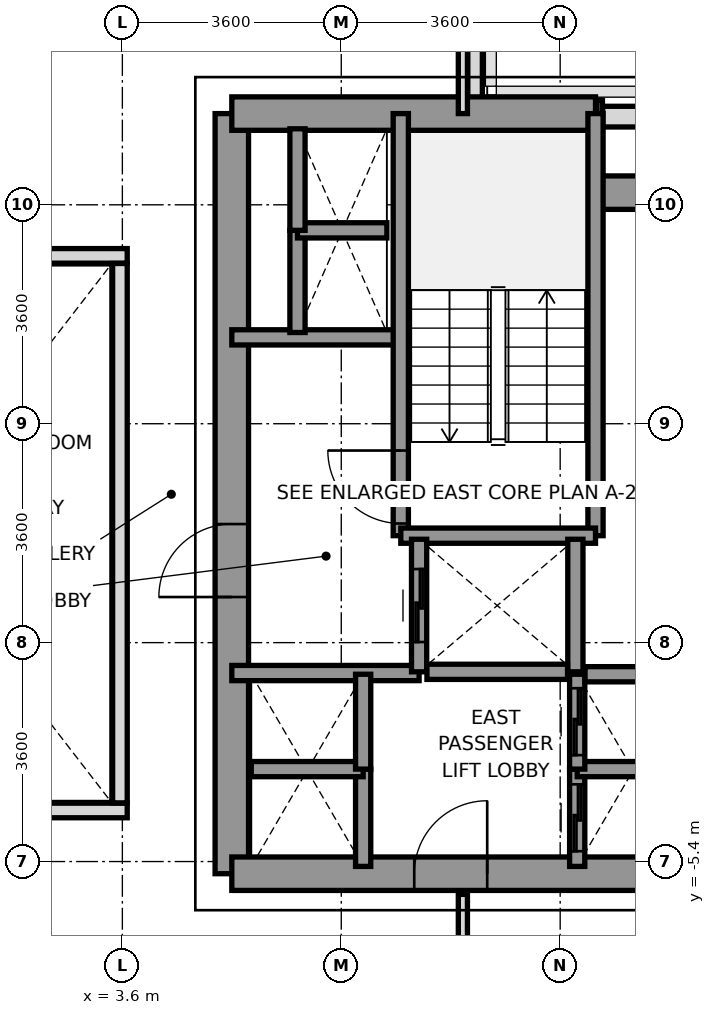
"""IFC4 building model, lengths in metres.
Left out: names, types, materials, properties, quantities, classifications, styles, units other than length and angle.
Written with IfcOpenShell. Run it as: python <this file> out.ifc"""

import sys

from ifc_helpers import new_model, si_unit, direction, frame, frame_2d, origin, place, context, subcontext, project, spatial, rectangle, extrude, source, transform, mapped, element, fill, save


model = new_model("IFC4")
c1 = context("Model", 3, precision=1e-05, world=origin(), true_north=direction((0.0, 1.0)))
c2 = subcontext(c1, "Body", "Model", "MODEL_VIEW")
j1 = project(units=[si_unit("LENGTHUNIT", "METRE"), si_unit("PLANEANGLEUNIT", "RADIAN")], contexts=[c1])
p1 = place(None, origin())
s1 = spatial("IfcSite", under=j1, at=p1, CompositionType="ELEMENT")
p2 = place(p1, origin())
s2 = spatial("IfcBuilding", under=s1, at=p2, CompositionType="ELEMENT")
p3 = place(p2, frame((0.0, 0.0, 85.0)))
s3 = spatial("IfcBuildingStorey", under=s2, at=p3, CompositionType="ELEMENT", Elevation=85.0)
p4 = place(p3, frame((11.498, 6.85, 0.0), z_axis=(0.0, 0.0, 1.0), x_axis=(1.0, 0.0, 0.0)))
e1 = element("IfcWall", 1, at=p4, inside=s3, PredefinedType="SOLIDWALL", context=c2, shape_type="SweptSolid", body=[
    extrude(rectangle(XDim=2.535, YDim=0.34, at=frame_2d((1.268, 0.0))), origin(), (0.0, 0.0, 1.0), 3.14),
])
p5 = place(p3, frame((9.4, 8.397, 0.0), z_axis=(0.0, 0.0, 1.0), x_axis=(0.0, -1.0, 0.0)))
e2 = element("IfcWall", 2, at=p5, inside=s3, PredefinedType="PARAPET", context=c2, shape_type="SweptSolid", body=[
    extrude(rectangle(XDim=1.444, YDim=0.24, at=frame_2d((0.722, 0.0))), origin(), (0.0, 0.0, 1.0), 1.15),
])
p6 = place(p3, frame((11.403, 7.0, 0.0), z_axis=(0.0, 0.0, 1.0), x_axis=(1.0, 0.0, 0.0)))
e3 = element("IfcWall", 3, at=p6, inside=s3, PredefinedType="PARAPET", context=c2, shape_type="SweptSolid", body=[
    extrude(rectangle(XDim=0.092, YDim=0.24, at=frame_2d((0.046, 0.0))), origin(), (0.0, 0.0, 1.0), 1.15),
])
p7 = place(p3, frame((5.4, -5.6, 0.0), z_axis=(0.0, 0.0, 1.0), x_axis=(0.0, 1.0, 0.0)))
e4 = element("IfcWall", 4, at=p7, inside=s3, PredefinedType="SHEAR", context=c2, shape_type="SweptSolid", body=[
    extrude(rectangle(XDim=12.5, YDim=0.55, at=frame_2d((6.25, 0.0))), origin(), (0.0, 0.0, 1.0), 3.14),
])
p8 = place(p7, frame((4.55, 0.0, 0.0)))
e5 = element("IfcOpeningElement", 5, at=p8, cuts=e4, PredefinedType="OPENING", context=c2, shape_type="SweptSolid", body=[
    extrude(rectangle(XDim=1.2, YDim=2.2, at=frame_2d((0.6, 1.1))), frame((0.0, 0.285, 0.0), z_axis=(0.0, -1.0, 0.0), x_axis=(1.0, 0.0, 0.0)), (0.0, 0.0, 1.0), 0.57),
])
p9 = place(p3, frame((5.4, 6.9, 0.0), z_axis=(0.0, 0.0, 1.0), x_axis=(1.0, 0.0, 0.0)))
e6 = element("IfcWall", 6, at=p9, inside=s3, PredefinedType="SHEAR", context=c2, shape_type="SweptSolid", body=[
    extrude(rectangle(XDim=5.981, YDim=0.55, at=frame_2d((2.991, 0.0))), origin(), (0.0, 0.0, 1.0), 3.14),
])
p10 = place(p3, frame((11.381, 5.6, 0.0), z_axis=(0.0, 0.0, 1.0), x_axis=(1.0, 0.0, 0.0)))
e7 = element("IfcWall", 7, at=p10, inside=s3, PredefinedType="SHEAR", context=c2, shape_type="SweptSolid", body=[
    extrude(rectangle(XDim=1.819, YDim=0.55, at=frame_2d((0.909, 0.0))), origin(), (0.0, 0.0, 1.0), 3.14),
])
p11 = place(p3, frame((5.4, -5.6, 0.0), z_axis=(0.0, 0.0, 1.0), x_axis=(1.0, 0.0, 0.0)))
e8 = element("IfcWall", 8, at=p11, inside=s3, PredefinedType="SHEAR", context=c2, shape_type="SweptSolid", body=[
    extrude(rectangle(XDim=7.8, YDim=0.55, at=frame_2d((3.9, 0.0))), origin(), (0.0, 0.0, 1.0), 3.14),
])
p12 = place(p11, frame((3.0, 0.0, 0.0)))
e9 = element("IfcOpeningElement", 9, at=p12, cuts=e8, PredefinedType="OPENING", context=c2, shape_type="SweptSolid", body=[
    extrude(rectangle(XDim=1.2, YDim=2.2, at=frame_2d((0.6, 1.1))), frame((0.0, 0.285, 0.0), z_axis=(0.0, -1.0, 0.0), x_axis=(1.0, 0.0, 0.0)), (0.0, 0.0, 1.0), 0.57),
])
p13 = place(p3, frame((5.4, 3.22, 0.0), z_axis=(0.0, 0.0, 1.0), x_axis=(1.0, 0.0, 0.0)))
e10 = element("IfcWall", 10, at=p13, inside=s3, PredefinedType="SOLIDWALL", context=c2, shape_type="SweptSolid", body=[
    extrude(rectangle(XDim=2.78, YDim=0.25, at=frame_2d((1.39, 0.0))), origin(), (0.0, 0.0, 1.0), 3.14),
])
p14 = place(p3, frame((5.4, -2.3, 0.0), z_axis=(0.0, 0.0, 1.0), x_axis=(1.0, 0.0, 0.0)))
e11 = element("IfcWall", 11, at=p14, inside=s3, PredefinedType="SOLIDWALL", context=c2, shape_type="SweptSolid", body=[
    extrude(rectangle(XDim=3.08, YDim=0.25, at=frame_2d((1.54, 0.0))), origin(), (0.0, 0.0, 1.0), 3.14),
])
p15 = place(p3, frame((8.179, -0.041, 0.0), z_axis=(0.0, 0.0, 1.0), x_axis=(0.0, 1.0, 0.0)))
e12 = element("IfcWall", 12, at=p15, inside=s3, PredefinedType="SOLIDWALL", context=c2, shape_type="SweptSolid", body=[
    extrude(rectangle(XDim=6.941, YDim=0.25, at=frame_2d((3.47, 0.0))), origin(), (0.0, 0.0, 1.0), 3.14),
])
p16 = place(p15, frame((0.2, 0.0, 0.0)))
e13 = element("IfcOpeningElement", 13, at=p16, cuts=e12, PredefinedType="OPENING", context=c2, shape_type="SweptSolid", body=[
    extrude(rectangle(XDim=1.2, YDim=2.2, at=frame_2d((0.6, 1.1))), frame((0.0, 0.135, 0.0), z_axis=(0.0, -1.0, 0.0), x_axis=(1.0, 0.0, 0.0)), (0.0, 0.0, 1.0), 0.27),
])
p17 = place(p3, frame((11.381, -0.041, 0.0), z_axis=(0.0, 0.0, 1.0), x_axis=(0.0, 1.0, 0.0)))
e14 = element("IfcWall", 14, at=p17, inside=s3, PredefinedType="SOLIDWALL", context=c2, shape_type="SweptSolid", body=[
    extrude(rectangle(XDim=6.941, YDim=0.25, at=frame_2d((3.47, 0.0))), origin(), (0.0, 0.0, 1.0), 3.14),
])
p18 = place(p3, frame((8.179, -0.041, 0.0), z_axis=(0.0, 0.0, 1.0), x_axis=(1.0, 0.0, 0.0)))
e15 = element("IfcWall", 15, at=p18, inside=s3, PredefinedType="SOLIDWALL", context=c2, shape_type="SweptSolid", body=[
    extrude(rectangle(XDim=3.202, YDim=0.25, at=frame_2d((1.601, 0.0))), origin(), (0.0, 0.0, 1.0), 3.14),
])
p19 = place(p3, frame((8.48, -2.28, 0.0), z_axis=(0.0, 0.0, 1.0), x_axis=(0.0, 1.0, 0.0)))
e16 = element("IfcWall", 16, at=p19, inside=s3, PredefinedType="SOLIDWALL", context=c2, shape_type="SweptSolid", body=[
    extrude(rectangle(XDim=2.18, YDim=0.25, at=frame_2d((1.09, 0.0))), origin(), (0.0, 0.0, 1.0), 3.14),
])
p20 = place(p19, frame((0.49, 0.0, 0.0)))
e17 = element("IfcOpeningElement", 17, at=p20, cuts=e16, PredefinedType="OPENING", context=c2, shape_type="SweptSolid", body=[
    extrude(rectangle(XDim=1.2, YDim=2.2, at=frame_2d((0.6, 1.1))), frame((0.0, 0.135, 0.0), z_axis=(0.0, -1.0, 0.0), x_axis=(1.0, 0.0, 0.0)), (0.0, 0.0, 1.0), 0.27),
])
p21 = place(p3, frame((11.05, -2.28, 0.0), z_axis=(0.0, 0.0, 1.0), x_axis=(0.0, 1.0, 0.0)))
e18 = element("IfcWall", 18, at=p21, inside=s3, PredefinedType="SOLIDWALL", context=c2, shape_type="SweptSolid", body=[
    extrude(rectangle(XDim=2.18, YDim=0.25, at=frame_2d((1.09, 0.0))), origin(), (0.0, 0.0, 1.0), 3.14),
])
p22 = place(p3, frame((8.609, -2.28, 0.0), z_axis=(0.0, 0.0, 1.0), x_axis=(1.0, 0.0, 0.0)))
e19 = element("IfcWall", 19, at=p22, inside=s3, PredefinedType="SOLIDWALL", context=c2, shape_type="SweptSolid", body=[
    extrude(rectangle(XDim=2.312, YDim=0.25, at=frame_2d((1.156, 0.0))), origin(), (0.0, 0.0, 1.0), 3.14),
])
p23 = place(p3, frame((11.08, -5.48, 0.0), z_axis=(0.0, 0.0, 1.0), x_axis=(0.0, 1.0, 0.0)))
e20 = element("IfcWall", 20, at=p23, inside=s3, PredefinedType="SOLIDWALL", context=c2, shape_type="SweptSolid", body=[
    extrude(rectangle(XDim=1.6, YDim=0.25, at=frame_2d((0.8, 0.0))), origin(), (0.0, 0.0, 1.0), 3.14),
])
p24 = place(p23, frame((0.25, 0.0, 0.0)))
e21 = element("IfcOpeningElement", 21, at=p24, cuts=e20, PredefinedType="OPENING", context=c2, shape_type="SweptSolid", body=[
    extrude(rectangle(XDim=1.1, YDim=2.2, at=frame_2d((0.55, 1.1))), frame((0.0, 0.135, 0.0), z_axis=(0.0, -1.0, 0.0), x_axis=(1.0, 0.0, 0.0)), (0.0, 0.0, 1.0), 0.27),
])
p25 = place(p3, frame((11.08, -3.88, 0.0), z_axis=(0.0, 0.0, 1.0), x_axis=(1.0, 0.0, 0.0)))
e22 = element("IfcWall", 22, at=p25, inside=s3, PredefinedType="SOLIDWALL", context=c2, shape_type="SweptSolid", body=[
    extrude(rectangle(XDim=1.84, YDim=0.25, at=frame_2d((0.92, 0.0))), origin(), (0.0, 0.0, 1.0), 3.14),
])
p26 = place(p3, frame((11.08, -3.88, 0.0), z_axis=(0.0, 0.0, 1.0), x_axis=(0.0, 1.0, 0.0)))
e23 = element("IfcWall", 23, at=p26, inside=s3, PredefinedType="SOLIDWALL", context=c2, shape_type="SweptSolid", body=[
    extrude(rectangle(XDim=1.56, YDim=0.25, at=frame_2d((0.78, 0.0))), origin(), (0.0, 0.0, 1.0), 3.14),
])
p27 = place(p26, frame((0.23, 0.0, 0.0)))
e24 = element("IfcOpeningElement", 24, at=p27, cuts=e23, PredefinedType="OPENING", context=c2, shape_type="SweptSolid", body=[
    extrude(rectangle(XDim=1.1, YDim=2.2, at=frame_2d((0.55, 1.1))), frame((0.0, 0.135, 0.0), z_axis=(0.0, -1.0, 0.0), x_axis=(1.0, 0.0, 0.0)), (0.0, 0.0, 1.0), 0.27),
])
p28 = place(p3, frame((11.209, -2.32, 0.0), z_axis=(0.0, 0.0, 1.0), x_axis=(1.0, 0.0, 0.0)))
e25 = element("IfcWall", 25, at=p28, inside=s3, PredefinedType="SOLIDWALL", context=c2, shape_type="SweptSolid", body=[
    extrude(rectangle(XDim=1.582, YDim=0.25, at=frame_2d((0.791, 0.0))), origin(), (0.0, 0.0, 1.0), 3.14),
])
p29 = place(p3, frame((7.56, -5.48, 0.0), z_axis=(0.0, 0.0, 1.0), x_axis=(0.0, 1.0, 0.0)))
e26 = element("IfcWall", 26, at=p29, inside=s3, PredefinedType="SOLIDWALL", context=c2, shape_type="SweptSolid", body=[
    extrude(rectangle(XDim=1.6, YDim=0.25, at=frame_2d((0.8, 0.0))), origin(), (0.0, 0.0, 1.0), 3.14),
])
p30 = place(p3, frame((5.72, -3.88, 0.0), z_axis=(0.0, 0.0, 1.0), x_axis=(1.0, 0.0, 0.0)))
e27 = element("IfcWall", 27, at=p30, inside=s3, PredefinedType="SOLIDWALL", context=c2, shape_type="SweptSolid", body=[
    extrude(rectangle(XDim=1.84, YDim=0.25, at=frame_2d((0.92, 0.0))), origin(), (0.0, 0.0, 1.0), 3.14),
])
p31 = place(p3, frame((7.56, -3.88, 0.0), z_axis=(0.0, 0.0, 1.0), x_axis=(0.0, 1.0, 0.0)))
e28 = element("IfcWall", 28, at=p31, inside=s3, PredefinedType="SOLIDWALL", context=c2, shape_type="SweptSolid", body=[
    extrude(rectangle(XDim=1.56, YDim=0.25, at=frame_2d((0.78, 0.0))), origin(), (0.0, 0.0, 1.0), 3.14),
])
p32 = place(p3, frame((6.48, 3.3, 0.0), z_axis=(0.0, 0.0, 1.0), x_axis=(0.0, 1.0, 0.0)))
e29 = element("IfcWall", 29, at=p32, inside=s3, PredefinedType="SOLIDWALL", context=c2, shape_type="SweptSolid", body=[
    extrude(rectangle(XDim=1.68, YDim=0.25, at=frame_2d((0.84, 0.0))), origin(), (0.0, 0.0, 1.0), 3.14),
])
p33 = place(p3, frame((6.48, 4.98, 0.0), z_axis=(0.0, 0.0, 1.0), x_axis=(1.0, 0.0, 0.0)))
e30 = element("IfcWall", 30, at=p33, inside=s3, PredefinedType="SOLIDWALL", context=c2, shape_type="SweptSolid", body=[
    extrude(rectangle(XDim=1.47, YDim=0.25, at=frame_2d((0.735, 0.0))), origin(), (0.0, 0.0, 1.0), 3.14),
])
p34 = place(p3, frame((6.48, 4.98, 0.0), z_axis=(0.0, 0.0, 1.0), x_axis=(0.0, 1.0, 0.0)))
e31 = element("IfcWall", 31, at=p34, inside=s3, PredefinedType="SOLIDWALL", context=c2, shape_type="SweptSolid", body=[
    extrude(rectangle(XDim=1.67, YDim=0.25, at=frame_2d((0.835, 0.0))), origin(), (0.0, 0.0, 1.0), 3.14),
])
p35 = place(p3, frame((9.2, 6.9, 0.0), z_axis=(0.0, 0.0, 1.0), x_axis=(0.0, 1.0, 0.0)))
e32 = element("IfcWall", 32, at=p35, inside=s3, PredefinedType="PARTITIONING", context=c2, shape_type="SweptSolid", body=[
    extrude(rectangle(XDim=8.78, YDim=0.15, at=frame_2d((4.39, 0.0))), origin(), (0.0, 0.0, 1.0), 2.59),
])
p36 = place(p3, frame((9.2, -15.68, 0.0), z_axis=(0.0, 0.0, 1.0), x_axis=(0.0, 1.0, 0.0)))
e33 = element("IfcWall", 33, at=p36, inside=s3, PredefinedType="PARTITIONING", context=c2, shape_type="SweptSolid", body=[
    extrude(rectangle(XDim=9.74, YDim=0.15, at=frame_2d((4.87, 0.0))), origin(), (0.0, 0.0, 1.0), 2.59),
])
for number, where, z_axis, x_axis in (
    (34, (-3.68, -4.56, 0.0), (0.0, 0.0, 1.0), (1.0, 0.0, 0.0)),
    (35, (-3.68, 4.56, 0.0), (0.0, 0.0, 1.0), (1.0, 0.0, 0.0)),
):
    element("IfcWall", number, at=place(p3, frame(where, z_axis=z_axis, x_axis=x_axis)), inside=s3, PredefinedType="PARAPET", context=c2, shape_type="SweptSolid", body=[
        extrude(rectangle(XDim=7.36, YDim=0.24, at=frame_2d((3.68, 0.0))), origin(), (0.0, 0.0, 1.0), 1.15),
    ])
p37 = place(p3, frame((3.56, -4.435, 0.0), z_axis=(0.0, 0.0, 1.0), x_axis=(0.0, 1.0, 0.0)))
e36 = element("IfcWall", 36, at=p37, inside=s3, PredefinedType="PARAPET", context=c2, shape_type="SweptSolid", body=[
    extrude(rectangle(XDim=8.87, YDim=0.24, at=frame_2d((4.435, 0.0))), origin(), (0.0, 0.0, 1.0), 1.15),
])
m1 = source(origin(), c2, "Body", "SweptSolid", [
    extrude(rectangle(XDim=1.2, YDim=2.2, at=frame_2d((0.6, 1.1))), frame((0.0, 0.025, 0.0), z_axis=(0.0, -1.0, 0.0), x_axis=(1.0, 0.0, 0.0)), (0.0, 0.0, 1.0), 0.05),
])
p38 = place(p16, origin())
e37 = element("IfcDoor", 37, at=p38, inside=s3, OperationType="SINGLE_SWING_RIGHT", PredefinedType="DOOR", context=c2, shape_type="MappedRepresentation", body=[
    mapped(m1, transform((0.0, 0.0, 0.0), x_axis=(1.0, 0.0, 0.0), y_axis=(0.0, 1.0, 0.0), z_axis=(0.0, 0.0, 1.0), scale=1.0)),
])
fill(e13, e37)
p39 = place(p8, origin())
e38 = element("IfcDoor", 38, at=p39, inside=s3, OperationType="SINGLE_SWING_LEFT", PredefinedType="DOOR", context=c2, shape_type="MappedRepresentation", body=[
    mapped(m1, transform((0.0, 0.0, 0.0), x_axis=(1.0, 0.0, 0.0), y_axis=(0.0, 1.0, 0.0), z_axis=(0.0, 0.0, 1.0), scale=1.0)),
])
fill(e5, e38)
p40 = place(p12, origin())
e39 = element("IfcDoor", 39, at=p40, inside=s3, OperationType="SINGLE_SWING_RIGHT", PredefinedType="DOOR", context=c2, shape_type="MappedRepresentation", body=[
    mapped(m1, transform((0.0, 0.0, 0.0), x_axis=(1.0, 0.0, 0.0), y_axis=(0.0, 1.0, 0.0), z_axis=(0.0, 0.0, 1.0), scale=1.0)),
])
fill(e9, e39)
p41 = place(p20, origin())
e40 = element("IfcDoor", 40, at=p41, inside=s3, OperationType="SLIDING_TO_RIGHT", PredefinedType="DOOR", context=c2, shape_type="MappedRepresentation", body=[
    mapped(m1, transform((0.0, 0.0, 0.0), x_axis=(1.0, 0.0, 0.0), y_axis=(0.0, 1.0, 0.0), z_axis=(0.0, 0.0, 1.0), scale=1.0)),
])
fill(e17, e40)
m2 = source(origin(), c2, "Body", "SweptSolid", [
    extrude(rectangle(XDim=1.1, YDim=2.2, at=frame_2d((0.55, 1.1))), frame((0.0, 0.025, 0.0), z_axis=(0.0, -1.0, 0.0), x_axis=(1.0, 0.0, 0.0)), (0.0, 0.0, 1.0), 0.05),
])
p42 = place(p24, origin())
e41 = element("IfcDoor", 41, at=p42, inside=s3, OperationType="SLIDING_TO_LEFT", PredefinedType="DOOR", context=c2, shape_type="MappedRepresentation", body=[
    mapped(m2, transform((0.0, 0.0, 0.0), x_axis=(1.0, 0.0, 0.0), y_axis=(0.0, 1.0, 0.0), z_axis=(0.0, 0.0, 1.0), scale=1.0)),
])
fill(e21, e41)
p43 = place(p27, origin())
e42 = element("IfcDoor", 42, at=p43, inside=s3, OperationType="SLIDING_TO_LEFT", PredefinedType="DOOR", context=c2, shape_type="MappedRepresentation", body=[
    mapped(m2, transform((0.0, 0.0, 0.0), x_axis=(1.0, 0.0, 0.0), y_axis=(0.0, 1.0, 0.0), z_axis=(0.0, 0.0, 1.0), scale=1.0)),
])
fill(e24, e42)
save(model, sys.argv[1])
